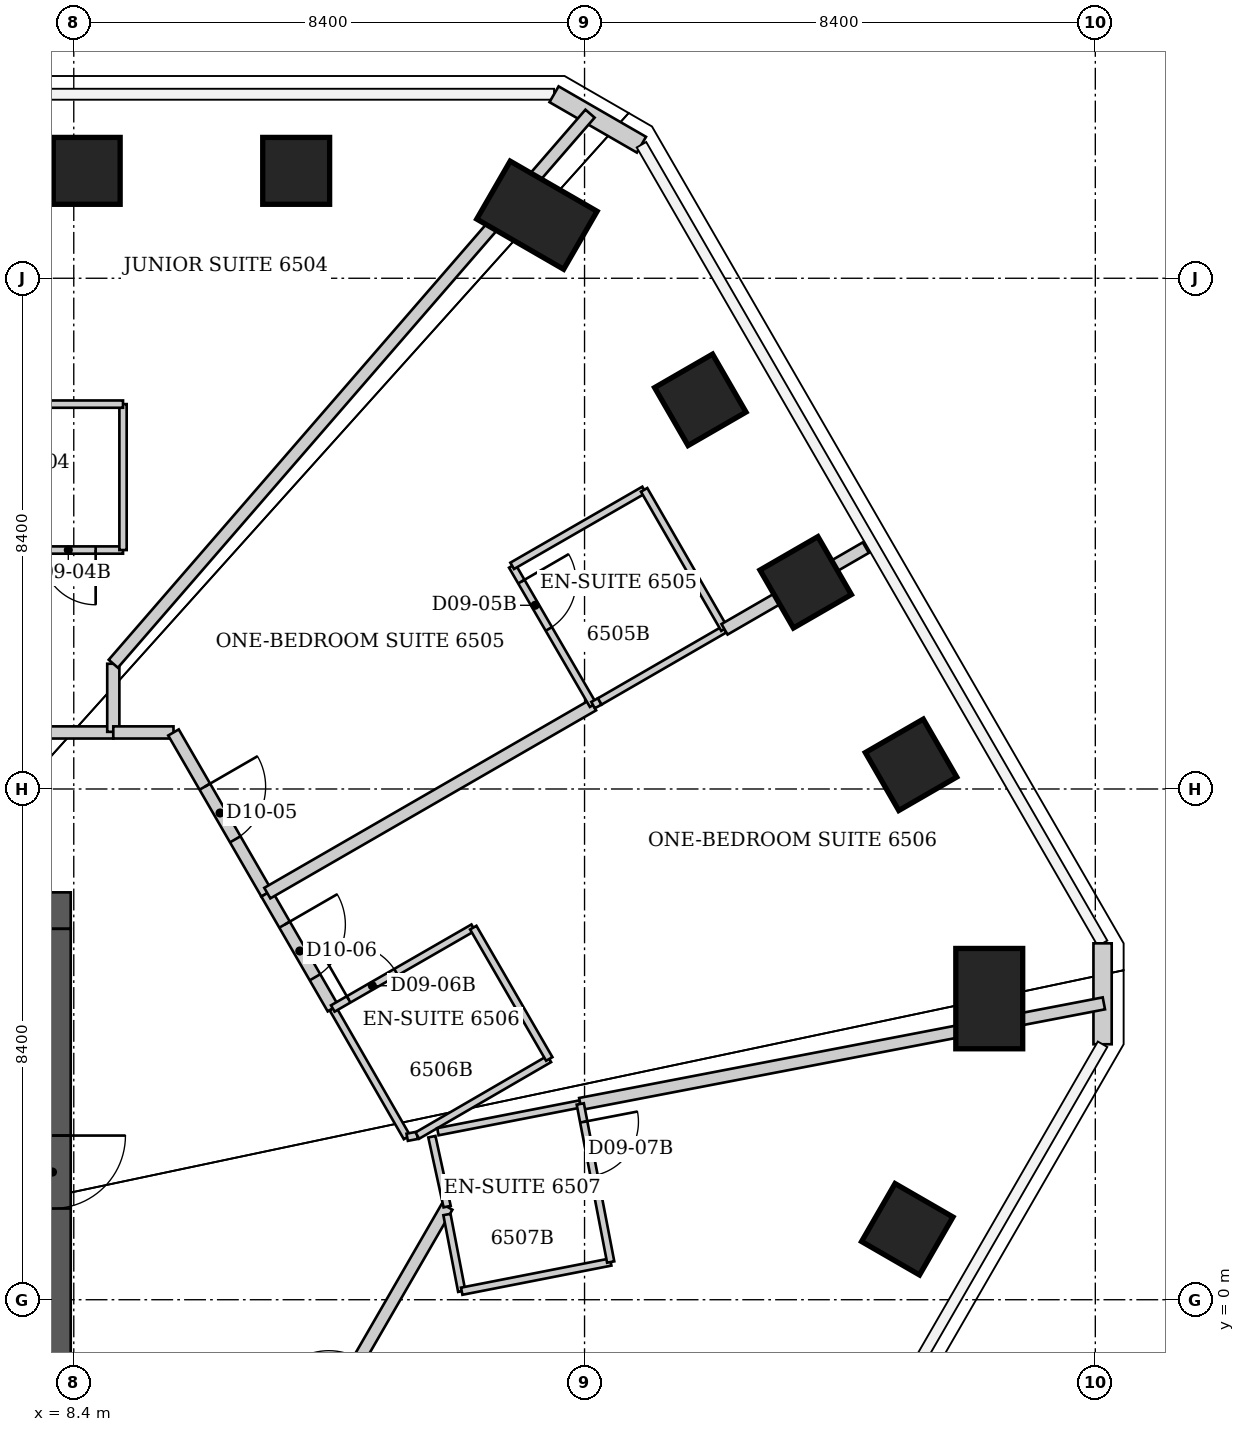
"""IFC4 building model, lengths in metres.
Left out: names, types, materials, properties, quantities, classifications, styles, units other than length and angle.
Written with IfcOpenShell. Run it as: python <this file> out.ifc"""

import sys

from ifc_helpers import new_model, si_unit, direction, frame, frame_2d, origin, origin_2d, place, context, subcontext, project, spatial, rectangle, extrude, element, fill, save


model = new_model("IFC4")
c1 = context("Model", 3, precision=1e-05, world=origin(), true_north=direction((0.0, 1.0)))
c2 = subcontext(c1, "Body", "Model", "MODEL_VIEW")
j1 = project(units=[si_unit("LENGTHUNIT", "METRE"), si_unit("PLANEANGLEUNIT", "RADIAN")], contexts=[c1])
p1 = place(None, origin())
s1 = spatial("IfcSite", under=j1, at=p1, CompositionType="ELEMENT")
p2 = place(p1, origin())
s2 = spatial("IfcBuilding", under=s1, at=p2, CompositionType="ELEMENT")
p3 = place(p2, frame((0.0, 0.0, 260.8)))
s3 = spatial("IfcBuildingStorey", under=s2, at=p3, CompositionType="ELEMENT", Elevation=260.8)
for number, where, z_axis, x_axis in (
    (1, (8.613, 18.566, 0.0), (0.0, 0.0, 1.0), (0.0, 1.0, 0.0)),
    (2, (12.058, 18.566, 0.0), (0.0, 0.0, 1.0), (0.0, 1.0, 0.0)),
):
    element("IfcColumn", number, at=place(p3, frame(where, z_axis=z_axis, x_axis=x_axis)), inside=s3, PredefinedType="COLUMN", context=c2, shape_type="SweptSolid", body=[
        extrude(rectangle(XDim=1.1, YDim=1.1, at=origin_2d()), origin(), (0.0, 0.0, 1.0), 3.8),
    ])
p4 = place(p3, frame((16.017, 17.837, 0.0), z_axis=(0.0, 0.0, 1.0), x_axis=(0.5, 0.866025403784, 0.0)))
e3 = element("IfcColumn", 3, at=p4, inside=s3, PredefinedType="COLUMN", context=c2, shape_type="SweptSolid", body=[
    extrude(rectangle(XDim=1.1, YDim=1.65, at=origin_2d()), origin(), (0.0, 0.0, 1.0), 3.8),
])
for number, where, z_axis, x_axis in (
    (4, (18.704, 14.8, 0.0), (0.0, 0.0, 1.0), (0.866, 0.5, 0.0)),
    (5, (20.437, 11.799, 0.0), (0.0, 0.0, 1.0), (0.866, 0.5, 0.0)),
    (6, (22.169, 8.798, 0.0), (0.0, 0.0, 1.0), (0.866, 0.5, 0.0)),
):
    element("IfcColumn", number, at=place(p3, frame(where, z_axis=z_axis, x_axis=x_axis)), inside=s3, PredefinedType="COLUMN", context=c2, shape_type="SweptSolid", body=[
        extrude(rectangle(XDim=1.1, YDim=1.1, at=origin_2d()), origin(), (0.0, 0.0, 1.0), 3.8),
    ])
p5 = place(p3, frame((23.456, 4.952, 0.0), z_axis=(0.0, 0.0, 1.0), x_axis=(1.0, 0.0, 0.0)))
e7 = element("IfcColumn", 7, at=p5, inside=s3, PredefinedType="COLUMN", context=c2, shape_type="SweptSolid", body=[
    extrude(rectangle(XDim=1.1, YDim=1.65, at=origin_2d()), origin(), (0.0, 0.0, 1.0), 3.8),
])
p6 = place(p3, frame((22.108, 1.159, 0.0), z_axis=(0.0, 0.0, 1.0), x_axis=(0.866025403784, -0.5, 0.0)))
e8 = element("IfcColumn", 8, at=p6, inside=s3, PredefinedType="COLUMN", context=c2, shape_type="SweptSolid", body=[
    extrude(rectangle(XDim=1.1, YDim=1.1, at=origin_2d()), origin(), (0.0, 0.0, 1.0), 3.8),
])
p7 = place(p3, frame((-8.35, 6.4, 0.0), z_axis=(0.0, 0.0, 1.0), x_axis=(1.0, 0.0, 0.0)))
e9 = element("IfcWall", 9, at=p7, inside=s3, PredefinedType="SHEAR", context=c2, shape_type="SweptSolid", body=[
    extrude(rectangle(XDim=16.7, YDim=0.6, at=frame_2d((8.35, 0.0))), origin(), (0.0, 0.0, 1.0), 3.8),
])
p8 = place(p7, frame((6.488, 0.0, 0.0)))
e10 = element("IfcOpeningElement", 10, at=p8, cuts=e9, PredefinedType="OPENING", context=c2, shape_type="SweptSolid", body=[
    extrude(rectangle(XDim=1.1, YDim=2.1, at=frame_2d((0.55, 1.05))), frame((0.0, 0.3, 0.0), z_axis=(0.0, -1.0, 0.0), x_axis=(1.0, 0.0, 0.0)), (0.0, 0.0, 1.0), 0.6),
])
p9 = place(p7, frame((9.113, 0.0, 0.0)))
e11 = element("IfcOpeningElement", 11, at=p9, cuts=e9, PredefinedType="OPENING", context=c2, shape_type="SweptSolid", body=[
    extrude(rectangle(XDim=1.1, YDim=2.1, at=frame_2d((0.55, 1.05))), frame((0.0, 0.3, 0.0), z_axis=(0.0, -1.0, 0.0), x_axis=(1.0, 0.0, 0.0)), (0.0, 0.0, 1.0), 0.6),
])
p10 = place(p7, frame((11.738, 0.0, 0.0)))
e12 = element("IfcOpeningElement", 12, at=p10, cuts=e9, PredefinedType="OPENING", context=c2, shape_type="SweptSolid", body=[
    extrude(rectangle(XDim=1.1, YDim=2.1, at=frame_2d((0.55, 1.05))), frame((0.0, 0.3, 0.0), z_axis=(0.0, -1.0, 0.0), x_axis=(1.0, 0.0, 0.0)), (0.0, 0.0, 1.0), 0.6),
])
p11 = place(p7, frame((14.363, 0.0, 0.0)))
e13 = element("IfcOpeningElement", 13, at=p11, cuts=e9, PredefinedType="OPENING", context=c2, shape_type="SweptSolid", body=[
    extrude(rectangle(XDim=1.1, YDim=2.1, at=frame_2d((0.55, 1.05))), frame((0.0, 0.3, 0.0), z_axis=(0.0, -1.0, 0.0), x_axis=(1.0, 0.0, 0.0)), (0.0, 0.0, 1.0), 0.6),
])
p12 = place(p3, frame((8.05, -6.1, 0.0), z_axis=(0.0, 0.0, 1.0), x_axis=(0.0, 1.0, 0.0)))
e14 = element("IfcWall", 14, at=p12, inside=s3, PredefinedType="SHEAR", context=c2, shape_type="SweptSolid", body=[
    extrude(rectangle(XDim=12.2, YDim=0.6, at=frame_2d((6.1, 0.0))), origin(), (0.0, 0.0, 1.0), 3.8),
])
p13 = place(p12, frame((7.6, 0.0, 0.0)))
e15 = element("IfcOpeningElement", 15, at=p13, cuts=e14, PredefinedType="OPENING", context=c2, shape_type="SweptSolid", body=[
    extrude(rectangle(XDim=1.2, YDim=2.2, at=frame_2d((0.6, 1.1))), frame((0.0, 0.3, 0.0), z_axis=(0.0, -1.0, 0.0), x_axis=(1.0, 0.0, 0.0)), (0.0, 0.0, 1.0), 0.6),
])
p14 = place(p3, frame((16.298, 19.826, 0.0), z_axis=(0.0, 0.0, 1.0), x_axis=(0.866026405774, -0.499998264499, 0.0)))
e16 = element("IfcWall", 16, at=p14, inside=s3, PredefinedType="SOLIDWALL", context=c2, shape_type="SweptSolid", body=[
    extrude(rectangle(XDim=1.66, YDim=0.3, at=frame_2d((0.83, 0.0))), origin(), (0.0, 0.0, 1.0), 3.64),
])
p15 = place(p3, frame((25.319, 5.862, 0.0), z_axis=(0.0, 0.0, 1.0), x_axis=(0.0, -1.0, 0.0)))
e17 = element("IfcWall", 17, at=p15, inside=s3, PredefinedType="SOLIDWALL", context=c2, shape_type="SweptSolid", body=[
    extrude(rectangle(XDim=1.66, YDim=0.3, at=frame_2d((0.83, 0.0))), origin(), (0.0, 0.0, 1.0), 3.64),
])
p16 = place(p3, frame((6.61, 9.33, 0.0), z_axis=(0.0, 0.0, 1.0), x_axis=(1.0, 0.0, 0.0)))
e18 = element("IfcWall", 18, at=p16, inside=s3, PredefinedType="PARTITIONING", context=c2, shape_type="SweptSolid", body=[
    extrude(rectangle(XDim=2.44, YDim=0.2, at=frame_2d((1.22, 0.0))), origin(), (0.0, 0.0, 1.0), 3.64),
])
p17 = place(p16, frame((0.32, 0.0, 0.0)))
e19 = element("IfcOpeningElement", 19, at=p17, cuts=e18, PredefinedType="OPENING", context=c2, shape_type="SweptSolid", body=[
    extrude(rectangle(XDim=1.0, YDim=2.13, at=frame_2d((0.5, 1.065))), frame((0.0, 0.1, 0.0), z_axis=(0.0, -1.0, 0.0), x_axis=(1.0, 0.0, 0.0)), (0.0, 0.0, 1.0), 0.2),
])
p18 = place(p3, frame((6.61, 12.33, 0.0), z_axis=(0.0, 0.0, 1.0), x_axis=(1.0, 0.0, 0.0)))
e20 = element("IfcWall", 20, at=p18, inside=s3, PredefinedType="PARTITIONING", context=c2, shape_type="SweptSolid", body=[
    extrude(rectangle(XDim=2.6, YDim=0.12, at=frame_2d((1.3, 0.0))), origin(), (0.0, 0.0, 1.0), 3.64),
])
p19 = place(p18, frame((1.25, 0.0, 0.0)))
e21 = element("IfcOpeningElement", 21, at=p19, cuts=e20, PredefinedType="OPENING", context=c2, shape_type="SweptSolid", body=[
    extrude(rectangle(XDim=0.9, YDim=2.03, at=frame_2d((0.45, 1.015))), frame((0.0, 0.06, 0.0), z_axis=(0.0, -1.0, 0.0), x_axis=(1.0, 0.0, 0.0)), (0.0, 0.0, 1.0), 0.12),
])
p20 = place(p3, frame((9.05, 10.46, 0.0), z_axis=(0.0, 0.0, 1.0), x_axis=(0.0, -1.0, 0.0)))
e22 = element("IfcWall", 22, at=p20, inside=s3, PredefinedType="PARTITIONING", context=c2, shape_type="SweptSolid", body=[
    extrude(rectangle(XDim=1.12, YDim=0.2, at=frame_2d((0.56, 0.0))), origin(), (0.0, 0.0, 1.0), 3.64),
])
p21 = place(p3, frame((9.21, 12.33, 0.0), z_axis=(0.0, 0.0, 1.0), x_axis=(0.0, 1.0, 0.0)))
e23 = element("IfcWall", 23, at=p21, inside=s3, PredefinedType="PARTITIONING", context=c2, shape_type="SweptSolid", body=[
    extrude(rectangle(XDim=2.4, YDim=0.12, at=frame_2d((1.2, 0.0))), origin(), (0.0, 0.0, 1.0), 3.64),
])
p22 = place(p3, frame((9.21, 14.73, 0.0), z_axis=(0.0, 0.0, 1.0), x_axis=(-1.0, 0.0, 0.0)))
e24 = element("IfcWall", 24, at=p22, inside=s3, PredefinedType="PARTITIONING", context=c2, shape_type="SweptSolid", body=[
    extrude(rectangle(XDim=2.6, YDim=0.12, at=frame_2d((1.3, 0.0))), origin(), (0.0, 0.0, 1.0), 3.64),
])
p23 = place(p3, frame((10.04, 9.33, 0.0), z_axis=(0.0, 0.0, 1.0), x_axis=(-1.0, 0.0, 0.0)))
e25 = element("IfcWall", 25, at=p23, inside=s3, PredefinedType="PARTITIONING", context=c2, shape_type="SweptSolid", body=[
    extrude(rectangle(XDim=0.99, YDim=0.2, at=frame_2d((0.495, 0.0))), origin(), (0.0, 0.0, 1.0), 3.64),
])
p24 = place(p3, frame((10.04, 9.33, 0.0), z_axis=(0.0, 0.0, 1.0), x_axis=(0.50033475521, -0.86583204649, 0.0)))
e26 = element("IfcWall", 26, at=p24, inside=s3, PredefinedType="PARTITIONING", context=c2, shape_type="SweptSolid", body=[
    extrude(rectangle(XDim=3.06, YDim=0.2, at=frame_2d((1.53, 0.0))), origin(), (0.0, 0.0, 1.0), 3.64),
])
p25 = place(p24, frame((1.03, 0.0, 0.0)))
e27 = element("IfcOpeningElement", 27, at=p25, cuts=e26, PredefinedType="OPENING", context=c2, shape_type="SweptSolid", body=[
    extrude(rectangle(XDim=1.0, YDim=2.13, at=frame_2d((0.5, 1.065))), frame((0.0, 0.1, 0.0), z_axis=(0.0, -1.0, 0.0), x_axis=(1.0, 0.0, 0.0)), (0.0, 0.0, 1.0), 0.2),
])
p26 = place(p3, frame((11.15, -4.34, 0.0), z_axis=(0.0, 0.0, 1.0), x_axis=(0.500113178326, 0.865960050386, 0.0)))
e28 = element("IfcWall", 28, at=p26, inside=s3, PredefinedType="PARTITIONING", context=c2, shape_type="SweptSolid", body=[
    extrude(rectangle(XDim=6.779, YDim=0.2, at=frame_2d((3.389, 0.0))), origin(), (0.0, 0.0, 1.0), 3.64),
])
p27 = place(p26, frame((2.889, 0.0, 0.0)))
e29 = element("IfcOpeningElement", 29, at=p27, cuts=e28, PredefinedType="OPENING", context=c2, shape_type="SweptSolid", body=[
    extrude(rectangle(XDim=1.0, YDim=2.13, at=frame_2d((0.5, 1.065))), frame((0.0, 0.1, 0.0), z_axis=(0.0, -1.0, 0.0), x_axis=(1.0, 0.0, 0.0)), (0.0, 0.0, 1.0), 0.2),
])
p28 = place(p3, frame((11.571, 6.681, 0.0), z_axis=(0.0, 0.0, 1.0), x_axis=(0.500374530646, -0.865809060406, 0.0)))
e30 = element("IfcWall", 30, at=p28, inside=s3, PredefinedType="PARTITIONING", context=c2, shape_type="SweptSolid", body=[
    extrude(rectangle(XDim=2.182, YDim=0.2, at=frame_2d((1.091, 0.0))), origin(), (0.0, 0.0, 1.0), 3.64),
])
p29 = place(p28, frame((0.591, 0.0, 0.0)))
e31 = element("IfcOpeningElement", 31, at=p29, cuts=e30, PredefinedType="OPENING", context=c2, shape_type="SweptSolid", body=[
    extrude(rectangle(XDim=1.0, YDim=2.13, at=frame_2d((0.5, 1.065))), frame((0.0, 0.1, 0.0), z_axis=(0.0, -1.0, 0.0), x_axis=(1.0, 0.0, 0.0)), (0.0, 0.0, 1.0), 0.2),
])
p30 = place(p3, frame((11.583, 6.688, 0.0), z_axis=(0.0, 0.0, 1.0), x_axis=(0.866046247233, 0.49996389635, 0.0)))
e32 = element("IfcWall", 32, at=p30, inside=s3, PredefinedType="PARTITIONING", context=c2, shape_type="SweptSolid", body=[
    extrude(rectangle(XDim=6.186, YDim=0.2, at=frame_2d((3.093, 0.0))), origin(), (0.0, 0.0, 1.0), 2.878),
])
p31 = place(p3, frame((12.66, 4.79, 0.0), z_axis=(0.0, 0.0, 1.0), x_axis=(0.498748634132, -0.866746675766, 0.0)))
e33 = element("IfcWall", 33, at=p31, inside=s3, PredefinedType="PARTITIONING", context=c2, shape_type="SweptSolid", body=[
    extrude(rectangle(XDim=2.446, YDim=0.12, at=frame_2d((1.223, 0.0))), origin(), (0.0, 0.0, 1.0), 3.64),
])
p32 = place(p3, frame((14.048, 2.704, 0.0), z_axis=(0.0, 0.0, 1.0), x_axis=(-0.981954528773, -0.189117168504, 0.0)))
e34 = element("IfcWall", 34, at=p32, inside=s3, PredefinedType="PARTITIONING", context=c2, shape_type="SweptSolid", body=[
    extrude(rectangle(XDim=0.168, YDim=0.12, at=frame_2d((0.084, 0.0))), origin(), (0.0, 0.0, 1.0), 3.64),
])
p33 = place(p3, frame((14.05, 2.7, 0.0), z_axis=(0.0, 0.0, 1.0), x_axis=(0.864779406007, 0.502151948065, 0.0)))
e35 = element("IfcWall", 35, at=p33, inside=s3, PredefinedType="PARTITIONING", context=c2, shape_type="SweptSolid", body=[
    extrude(rectangle(XDim=2.509, YDim=0.12, at=frame_2d((1.255, 0.0))), origin(), (0.0, 0.0, 1.0), 3.64),
])
p34 = place(p3, frame((14.537, 1.402, 0.0), z_axis=(0.0, 0.0, 1.0), x_axis=(0.189058811395, -0.981965766121, 0.0)))
e36 = element("IfcWall", 36, at=p34, inside=s3, PredefinedType="PARTITIONING", context=c2, shape_type="SweptSolid", body=[
    extrude(rectangle(XDim=1.285, YDim=0.12, at=frame_2d((0.643, 0.0))), origin(), (0.0, 0.0, 1.0), 3.64),
])
p35 = place(p3, frame((14.54, 1.531, 0.0), z_axis=(0.0, 0.0, 1.0), x_axis=(-0.213239076566, 0.977000049245, 0.0)))
e37 = element("IfcWall", 37, at=p35, inside=s3, PredefinedType="PARTITIONING", context=c2, shape_type="SweptSolid", body=[
    extrude(rectangle(XDim=1.177, YDim=0.12, at=frame_2d((0.588, 0.0))), origin(), (0.0, 0.0, 1.0), 3.64),
])
p36 = place(p3, frame((14.78, 0.14, 0.0), z_axis=(0.0, 0.0, 1.0), x_axis=(0.981325695508, 0.192353526962, 0.0)))
e38 = element("IfcWall", 38, at=p36, inside=s3, PredefinedType="PARTITIONING", context=c2, shape_type="SweptSolid", body=[
    extrude(rectangle(XDim=2.497, YDim=0.12, at=frame_2d((1.248, 0.0))), origin(), (0.0, 0.0, 1.0), 3.64),
])
p37 = place(p3, frame((14.97, 6.12, 0.0), z_axis=(0.0, 0.0, 1.0), x_axis=(-0.866615255992, -0.498976951453, 0.0)))
e39 = element("IfcWall", 39, at=p37, inside=s3, PredefinedType="PARTITIONING", context=c2, shape_type="SweptSolid", body=[
    extrude(rectangle(XDim=2.666, YDim=0.12, at=frame_2d((1.333, 0.0))), origin(), (0.0, 0.0, 1.0), 3.64),
])
p38 = place(p37, frame((1.466, 0.0, 0.0)))
e40 = element("IfcOpeningElement", 40, at=p38, cuts=e39, PredefinedType="OPENING", context=c2, shape_type="SweptSolid", body=[
    extrude(rectangle(XDim=0.9, YDim=2.03, at=frame_2d((0.45, 1.015))), frame((0.0, 0.06, 0.0), z_axis=(0.0, -1.0, 0.0), x_axis=(1.0, 0.0, 0.0)), (0.0, 0.0, 1.0), 0.12),
])
p39 = place(p3, frame((15.61, 12.07, 0.0), z_axis=(0.0, 0.0, 1.0), x_axis=(0.502173326652, -0.864766991738, 0.0)))
e41 = element("IfcWall", 41, at=p39, inside=s3, PredefinedType="PARTITIONING", context=c2, shape_type="SweptSolid", body=[
    extrude(rectangle(XDim=2.648, YDim=0.12, at=frame_2d((1.324, 0.0))), origin(), (0.0, 0.0, 1.0), 3.64),
])
p40 = place(p39, frame((0.3, 0.0, 0.0)))
e42 = element("IfcOpeningElement", 42, at=p40, cuts=e41, PredefinedType="OPENING", context=c2, shape_type="SweptSolid", body=[
    extrude(rectangle(XDim=0.9, YDim=2.03, at=frame_2d((0.45, 1.015))), frame((0.0, 0.06, 0.0), z_axis=(0.0, -1.0, 0.0), x_axis=(1.0, 0.0, 0.0)), (0.0, 0.0, 1.0), 0.12),
])
p41 = place(p3, frame((16.22, 3.96, 0.0), z_axis=(0.0, 0.0, 1.0), x_axis=(-0.500893576935, 0.865508881864, 0.0)))
e43 = element("IfcWall", 43, at=p41, inside=s3, PredefinedType="PARTITIONING", context=c2, shape_type="SweptSolid", body=[
    extrude(rectangle(XDim=2.496, YDim=0.12, at=frame_2d((1.248, 0.0))), origin(), (0.0, 0.0, 1.0), 3.64),
])
p42 = place(p3, frame((16.73, 3.22, 0.0), z_axis=(0.0, 0.0, 1.0), x_axis=(-0.981490592026, -0.19151035942, 0.0)))
e44 = element("IfcWall", 44, at=p42, inside=s3, PredefinedType="PARTITIONING", context=c2, shape_type="SweptSolid", body=[
    extrude(rectangle(XDim=2.386, YDim=0.12, at=frame_2d((1.193, 0.0))), origin(), (0.0, 0.0, 1.0), 3.64),
])
p43 = place(p3, frame((16.73, 3.22, 0.0), z_axis=(0.0, 0.0, 1.0), x_axis=(0.982039995549, 0.188672857462, 0.0)))
e45 = element("IfcWall", 45, at=p43, inside=s3, PredefinedType="PARTITIONING", context=c2, shape_type="SweptSolid", body=[
    extrude(rectangle(XDim=8.768, YDim=0.2, at=frame_2d((4.384, 0.0))), origin(), (0.0, 0.0, 1.0), 3.64),
])
p44 = place(p3, frame((16.89, 19.507, 0.0), z_axis=(0.0, 0.0, 1.0), x_axis=(-0.654896377117, -0.755718687899, 0.0)))
e46 = element("IfcWall", 46, at=p44, inside=s3, PredefinedType="PARTITIONING", context=c2, shape_type="SweptSolid", body=[
    extrude(rectangle(XDim=11.972, YDim=0.2, at=frame_2d((5.986, 0.0))), origin(), (0.0, 0.0, 1.0), 3.64),
])
p45 = place(p3, frame((16.94, 9.78, 0.0), z_axis=(0.0, 0.0, 1.0), x_axis=(0.877895572914, 0.478852130681, 0.0)))
e47 = element("IfcWall", 47, at=p45, inside=s3, PredefinedType="PARTITIONING", context=c2, shape_type="SweptSolid", body=[
    extrude(rectangle(XDim=0.125, YDim=0.12, at=frame_2d((0.063, 0.0))), origin(), (0.0, 0.0, 1.0), 3.64),
])
p46 = place(p3, frame((17.05, 9.84, 0.0), z_axis=(0.0, 0.0, 1.0), x_axis=(0.865741107356, 0.500492092878, 0.0)))
e48 = element("IfcWall", 48, at=p46, inside=s3, PredefinedType="PARTITIONING", context=c2, shape_type="SweptSolid", body=[
    extrude(rectangle(XDim=2.37, YDim=0.12, at=frame_2d((1.185, 0.0))), origin(), (0.0, 0.0, 1.0), 2.878),
])
p47 = place(p3, frame((17.23, 0.62, 0.0), z_axis=(0.0, 0.0, 1.0), x_axis=(-0.18885765444, 0.982004473696, 0.0)))
e49 = element("IfcWall", 49, at=p47, inside=s3, PredefinedType="PARTITIONING", context=c2, shape_type="SweptSolid", body=[
    extrude(rectangle(XDim=2.647, YDim=0.12, at=frame_2d((1.324, 0.0))), origin(), (0.0, 0.0, 1.0), 3.64),
])
p48 = place(p47, frame((1.448, 0.0, 0.0)))
e50 = element("IfcOpeningElement", 50, at=p48, cuts=e49, PredefinedType="OPENING", context=c2, shape_type="SweptSolid", body=[
    extrude(rectangle(XDim=0.9, YDim=2.03, at=frame_2d((0.45, 1.015))), frame((0.0, 0.06, 0.0), z_axis=(0.0, -1.0, 0.0), x_axis=(1.0, 0.0, 0.0)), (0.0, 0.0, 1.0), 0.12),
])
p49 = place(p3, frame((17.78, 13.32, 0.0), z_axis=(0.0, 0.0, 1.0), x_axis=(-0.86653430447, -0.499117520406, 0.0)))
e51 = element("IfcWall", 51, at=p49, inside=s3, PredefinedType="PARTITIONING", context=c2, shape_type="SweptSolid", body=[
    extrude(rectangle(XDim=2.504, YDim=0.12, at=frame_2d((1.252, 0.0))), origin(), (0.0, 0.0, 1.0), 3.64),
])
p50 = place(p3, frame((19.1, 11.03, 0.0), z_axis=(0.0, 0.0, 1.0), x_axis=(-0.499407914056, 0.866366975004, 0.0)))
e52 = element("IfcWall", 52, at=p50, inside=s3, PredefinedType="PARTITIONING", context=c2, shape_type="SweptSolid", body=[
    extrude(rectangle(XDim=2.643, YDim=0.12, at=frame_2d((1.322, 0.0))), origin(), (0.0, 0.0, 1.0), 3.64),
])
p51 = place(p3, frame((19.102, 11.026, 0.0), z_axis=(0.0, 0.0, 1.0), x_axis=(0.865741604349, 0.50049123319, 0.0)))
e53 = element("IfcWall", 53, at=p51, inside=s3, PredefinedType="PARTITIONING", context=c2, shape_type="SweptSolid", body=[
    extrude(rectangle(XDim=2.684, YDim=0.2, at=frame_2d((1.342, 0.0))), origin(), (0.0, 0.0, 1.0), 2.878),
])
p52 = place(p19, origin())
e54 = element("IfcDoor", 54, at=p52, inside=s3, OperationType="SINGLE_SWING_RIGHT", PredefinedType="DOOR", context=c2, shape_type="SweptSolid", body=[
    extrude(rectangle(XDim=0.9, YDim=2.03, at=frame_2d((0.45, 1.015))), frame((0.0, 0.025, 0.0), z_axis=(0.0, -1.0, 0.0), x_axis=(1.0, 0.0, 0.0)), (0.0, 0.0, 1.0), 0.05),
])
fill(e21, e54)
p53 = place(p25, origin())
e55 = element("IfcDoor", 55, at=p53, inside=s3, OperationType="SINGLE_SWING_LEFT", PredefinedType="DOOR", context=c2, shape_type="SweptSolid", body=[
    extrude(rectangle(XDim=1.0, YDim=2.13, at=frame_2d((0.5, 1.065))), frame((0.0, 0.025, 0.0), z_axis=(0.0, -1.0, 0.0), x_axis=(1.0, 0.0, 0.0)), (0.0, 0.0, 1.0), 0.05),
])
fill(e27, e55)
p54 = place(p40, origin())
e56 = element("IfcDoor", 56, at=p54, inside=s3, OperationType="SINGLE_SWING_LEFT", PredefinedType="DOOR", context=c2, shape_type="SweptSolid", body=[
    extrude(rectangle(XDim=0.9, YDim=2.03, at=frame_2d((0.45, 1.015))), frame((0.0, 0.025, 0.0), z_axis=(0.0, -1.0, 0.0), x_axis=(1.0, 0.0, 0.0)), (0.0, 0.0, 1.0), 0.05),
])
fill(e42, e56)
p55 = place(p29, origin())
e57 = element("IfcDoor", 57, at=p55, inside=s3, OperationType="SINGLE_SWING_LEFT", PredefinedType="DOOR", context=c2, shape_type="SweptSolid", body=[
    extrude(rectangle(XDim=1.0, YDim=2.13, at=frame_2d((0.5, 1.065))), frame((0.0, 0.025, 0.0), z_axis=(0.0, -1.0, 0.0), x_axis=(1.0, 0.0, 0.0)), (0.0, 0.0, 1.0), 0.05),
])
fill(e31, e57)
p56 = place(p38, origin())
e58 = element("IfcDoor", 58, at=p56, inside=s3, OperationType="SINGLE_SWING_RIGHT", PredefinedType="DOOR", context=c2, shape_type="SweptSolid", body=[
    extrude(rectangle(XDim=0.9, YDim=2.03, at=frame_2d((0.45, 1.015))), frame((0.0, 0.025, 0.0), z_axis=(0.0, -1.0, 0.0), x_axis=(1.0, 0.0, 0.0)), (0.0, 0.0, 1.0), 0.05),
])
fill(e40, e58)
p57 = place(p48, origin())
e59 = element("IfcDoor", 59, at=p57, inside=s3, OperationType="SINGLE_SWING_RIGHT", PredefinedType="DOOR", context=c2, shape_type="SweptSolid", body=[
    extrude(rectangle(XDim=0.9, YDim=2.03, at=frame_2d((0.45, 1.015))), frame((0.0, 0.025, 0.0), z_axis=(0.0, -1.0, 0.0), x_axis=(1.0, 0.0, 0.0)), (0.0, 0.0, 1.0), 0.05),
])
fill(e50, e59)
p58 = place(p13, origin())
e60 = element("IfcDoor", 60, at=p58, inside=s3, OperationType="SINGLE_SWING_RIGHT", PredefinedType="DOOR", context=c2, shape_type="SweptSolid", body=[
    extrude(rectangle(XDim=1.2, YDim=2.2, at=frame_2d((0.6, 1.1))), frame((0.0, 0.025, 0.0), z_axis=(0.0, -1.0, 0.0), x_axis=(1.0, 0.0, 0.0)), (0.0, 0.0, 1.0), 0.05),
])
fill(e15, e60)
save(model, sys.argv[1])
